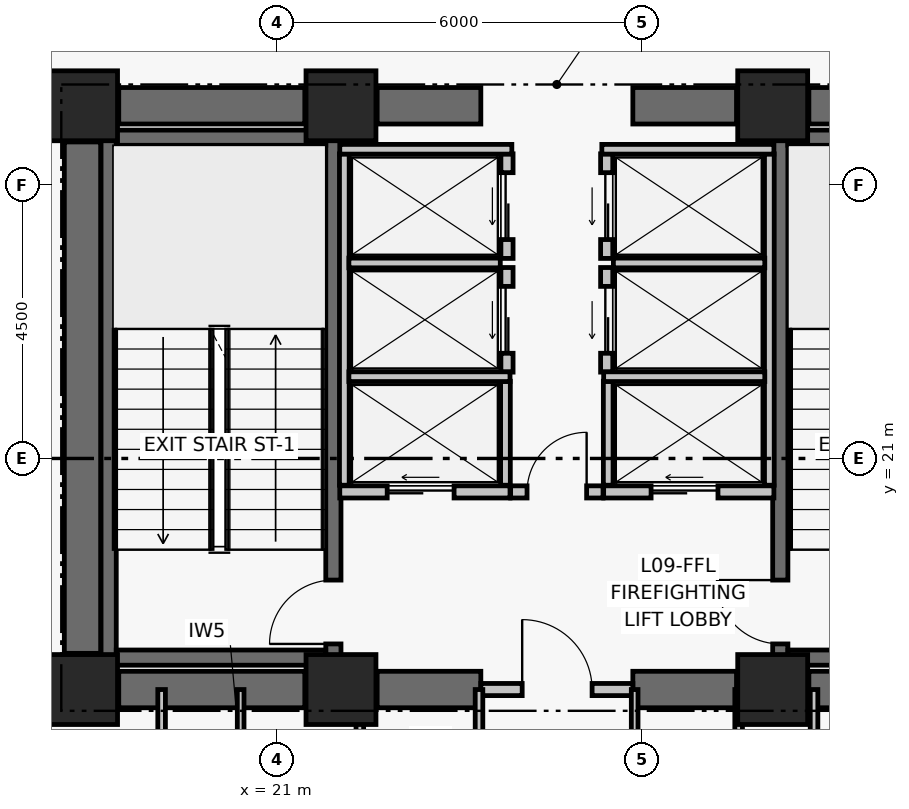
"""IFC4 building model, lengths in metres.
Left out: names, types, materials, properties, quantities, classifications, styles, units other than length and angle.
Written with IfcOpenShell. Run it as: python <this file> out.ifc"""

import sys

from ifc_helpers import new_model, si_unit, direction, frame, frame_2d, origin, origin_2d, place, context, subcontext, project, spatial, rectangle, extrude, element, fill, save


model = new_model("IFC4")
c1 = context("Model", 3, precision=1e-05, world=origin(), true_north=direction((0.0, 1.0)))
c2 = subcontext(c1, "Body", "Model", "MODEL_VIEW")
j1 = project(units=[si_unit("LENGTHUNIT", "METRE"), si_unit("PLANEANGLEUNIT", "RADIAN")], contexts=[c1])
p1 = place(None, origin())
s1 = spatial("IfcSite", under=j1, at=p1, CompositionType="ELEMENT")
p2 = place(p1, origin())
s2 = spatial("IfcBuilding", under=s1, at=p2, CompositionType="ELEMENT")
p3 = place(p2, frame((0.0, 0.0, 42.48)))
s3 = spatial("IfcBuildingStorey", under=s2, at=p3, CompositionType="ELEMENT", Elevation=42.48)
for number, where, z_axis, x_axis in (
    (1, (17.8, 17.2, 0.0), (0.0, 0.0, 1.0), (1.0, 0.0, 0.0)),
    (2, (22.05, 17.2, 0.0), (0.0, 0.0, 1.0), (1.0, 0.0, 0.0)),
    (3, (29.15, 17.2, 0.0), (0.0, 0.0, 1.0), (1.0, 0.0, 0.0)),
    (4, (17.8, 26.8, 0.0), (0.0, 0.0, 1.0), (1.0, 0.0, 0.0)),
    (5, (22.05, 26.8, 0.0), (0.0, 0.0, 1.0), (1.0, 0.0, 0.0)),
    (6, (29.15, 26.8, 0.0), (0.0, 0.0, 1.0), (1.0, 0.0, 0.0)),
):
    element("IfcColumn", number, at=place(p3, frame(where, z_axis=z_axis, x_axis=x_axis)), inside=s3, PredefinedType="COLUMN", context=c2, shape_type="SweptSolid", body=[
        extrude(rectangle(XDim=1.15, YDim=1.15, at=origin_2d()), origin(), (0.0, 0.0, 1.0), 3.72),
    ])
p4 = place(p3, frame((18.395, 17.2, 0.0), z_axis=(0.0, 0.0, 1.0), x_axis=(1.0, 0.0, 0.0)))
e7 = element("IfcWall", 7, at=p4, inside=s3, PredefinedType="SHEAR", context=c2, shape_type="SweptSolid", body=[
    extrude(rectangle(XDim=3.06, YDim=0.6, at=frame_2d((1.53, 0.0))), origin(), (0.0, 0.0, 1.0), 3.47),
])
p5 = place(p3, frame((22.645, 17.2, 0.0), z_axis=(0.0, 0.0, 1.0), x_axis=(1.0, 0.0, 0.0)))
e8 = element("IfcWall", 8, at=p5, inside=s3, PredefinedType="SHEAR", context=c2, shape_type="SweptSolid", body=[
    extrude(rectangle(XDim=1.705, YDim=0.6, at=frame_2d((0.853, 0.0))), origin(), (0.0, 0.0, 1.0), 3.47),
])
p6 = place(p3, frame((26.85, 17.2, 0.0), z_axis=(0.0, 0.0, 1.0), x_axis=(1.0, 0.0, 0.0)))
e9 = element("IfcWall", 9, at=p6, inside=s3, PredefinedType="SHEAR", context=c2, shape_type="SweptSolid", body=[
    extrude(rectangle(XDim=1.705, YDim=0.6, at=frame_2d((0.853, 0.0))), origin(), (0.0, 0.0, 1.0), 3.47),
])
p7 = place(p3, frame((29.745, 17.2, 0.0), z_axis=(0.0, 0.0, 1.0), x_axis=(1.0, 0.0, 0.0)))
e10 = element("IfcWall", 10, at=p7, inside=s3, PredefinedType="SHEAR", context=c2, shape_type="SweptSolid", body=[
    extrude(rectangle(XDim=3.06, YDim=0.6, at=frame_2d((1.53, 0.0))), origin(), (0.0, 0.0, 1.0), 3.47),
])
p8 = place(p3, frame((18.395, 26.8, 0.0), z_axis=(0.0, 0.0, 1.0), x_axis=(1.0, 0.0, 0.0)))
e11 = element("IfcWall", 11, at=p8, inside=s3, PredefinedType="SHEAR", context=c2, shape_type="SweptSolid", body=[
    extrude(rectangle(XDim=3.06, YDim=0.6, at=frame_2d((1.53, 0.0))), origin(), (0.0, 0.0, 1.0), 3.47),
])
p9 = place(p3, frame((22.645, 26.8, 0.0), z_axis=(0.0, 0.0, 1.0), x_axis=(1.0, 0.0, 0.0)))
e12 = element("IfcWall", 12, at=p9, inside=s3, PredefinedType="SHEAR", context=c2, shape_type="SweptSolid", body=[
    extrude(rectangle(XDim=1.705, YDim=0.6, at=frame_2d((0.853, 0.0))), origin(), (0.0, 0.0, 1.0), 3.47),
])
p10 = place(p3, frame((26.85, 26.8, 0.0), z_axis=(0.0, 0.0, 1.0), x_axis=(1.0, 0.0, 0.0)))
e13 = element("IfcWall", 13, at=p10, inside=s3, PredefinedType="SHEAR", context=c2, shape_type="SweptSolid", body=[
    extrude(rectangle(XDim=1.705, YDim=0.6, at=frame_2d((0.853, 0.0))), origin(), (0.0, 0.0, 1.0), 3.47),
])
p11 = place(p3, frame((29.745, 26.8, 0.0), z_axis=(0.0, 0.0, 1.0), x_axis=(1.0, 0.0, 0.0)))
e14 = element("IfcWall", 14, at=p11, inside=s3, PredefinedType="SHEAR", context=c2, shape_type="SweptSolid", body=[
    extrude(rectangle(XDim=3.06, YDim=0.6, at=frame_2d((1.53, 0.0))), origin(), (0.0, 0.0, 1.0), 3.47),
])
p12 = place(p3, frame((17.8, 17.795, 0.0), z_axis=(0.0, 0.0, 1.0), x_axis=(0.0, 1.0, 0.0)))
e15 = element("IfcWall", 15, at=p12, inside=s3, PredefinedType="SHEAR", context=c2, shape_type="SweptSolid", body=[
    extrude(rectangle(XDim=8.41, YDim=0.6, at=frame_2d((4.205, 0.0))), origin(), (0.0, 0.0, 1.0), 3.47),
])
p13 = place(p3, frame((18.229, 17.6, 0.0), z_axis=(0.0, 0.0, 1.0), x_axis=(0.0, 1.0, 0.0)))
e16 = element("IfcWall", 16, at=p13, inside=s3, PredefinedType="SHEAR", context=c2, shape_type="SweptSolid", body=[
    extrude(rectangle(XDim=8.8, YDim=0.25, at=frame_2d((4.4, 0.0))), origin(), (0.0, 0.0, 1.0), 3.47),
])
p14 = place(p3, frame((21.925, 17.6, 0.0), z_axis=(0.0, 0.0, 1.0), x_axis=(0.0, 1.0, 0.0)))
e17 = element("IfcWall", 17, at=p14, inside=s3, PredefinedType="SHEAR", context=c2, shape_type="SweptSolid", body=[
    extrude(rectangle(XDim=8.8, YDim=0.25, at=frame_2d((4.4, 0.0))), origin(), (0.0, 0.0, 1.0), 3.47),
])
p15 = place(p14, frame((0.35, 0.0, 0.0)))
e18 = element("IfcOpeningElement", 18, at=p15, cuts=e17, PredefinedType="OPENING", context=c2, shape_type="SweptSolid", body=[
    extrude(rectangle(XDim=1.05, YDim=2.08, at=frame_2d((0.525, 1.04))), frame((0.0, 0.135, 0.0), z_axis=(0.0, -1.0, 0.0), x_axis=(1.0, 0.0, 0.0)), (0.0, 0.0, 1.0), 0.27),
])
for number, where, z_axis, x_axis in (
    (19, (18.354, 17.725, 0.0), (0.0, 0.0, 1.0), (1.0, 0.0, 0.0)),
    (20, (18.354, 26.275, 0.0), (0.0, 0.0, 1.0), (1.0, 0.0, 0.0)),
):
    element("IfcWall", number, at=place(p3, frame(where, z_axis=z_axis, x_axis=x_axis)), inside=s3, PredefinedType="SHEAR", context=c2, shape_type="SweptSolid", body=[
        extrude(rectangle(XDim=3.446, YDim=0.25, at=frame_2d((1.723, 0.0))), origin(), (0.0, 0.0, 1.0), 3.47),
    ])
p16 = place(p3, frame((29.275, 17.6, 0.0), z_axis=(0.0, 0.0, 1.0), x_axis=(0.0, 1.0, 0.0)))
e21 = element("IfcWall", 21, at=p16, inside=s3, PredefinedType="SHEAR", context=c2, shape_type="SweptSolid", body=[
    extrude(rectangle(XDim=8.8, YDim=0.25, at=frame_2d((4.4, 0.0))), origin(), (0.0, 0.0, 1.0), 3.47),
])
p17 = place(p16, frame((0.35, 0.0, 0.0)))
e22 = element("IfcOpeningElement", 22, at=p17, cuts=e21, PredefinedType="OPENING", context=c2, shape_type="SweptSolid", body=[
    extrude(rectangle(XDim=1.05, YDim=2.08, at=frame_2d((0.525, 1.04))), frame((0.0, 0.135, 0.0), z_axis=(0.0, -1.0, 0.0), x_axis=(1.0, 0.0, 0.0)), (0.0, 0.0, 1.0), 0.27),
])
for number, where, z_axis, x_axis in (
    (23, (29.4, 17.725, 0.0), (0.0, 0.0, 1.0), (1.0, 0.0, 0.0)),
    (24, (29.4, 26.275, 0.0), (0.0, 0.0, 1.0), (1.0, 0.0, 0.0)),
):
    element("IfcWall", number, at=place(p3, frame(where, z_axis=z_axis, x_axis=x_axis)), inside=s3, PredefinedType="SHEAR", context=c2, shape_type="SweptSolid", body=[
        extrude(rectangle(XDim=3.446, YDim=0.25, at=frame_2d((1.723, 0.0))), origin(), (0.0, 0.0, 1.0), 3.47),
    ])
p18 = place(p3, frame((24.35, 17.2, 0.0), z_axis=(0.0, 0.0, 1.0), x_axis=(1.0, 0.0, 0.0)))
e25 = element("IfcWall", 25, at=p18, inside=s3, PredefinedType="PARTITIONING", context=c2, shape_type="SweptSolid", body=[
    extrude(rectangle(XDim=2.5, YDim=0.2, at=frame_2d((1.25, 0.0))), origin(), (0.0, 0.0, 1.0), 2.6),
])
p19 = place(p18, frame((0.68, 0.0, 0.0)))
e26 = element("IfcOpeningElement", 26, at=p19, cuts=e25, PredefinedType="OPENING", context=c2, shape_type="SweptSolid", body=[
    extrude(rectangle(XDim=1.15, YDim=2.08, at=frame_2d((0.575, 1.04))), frame((0.0, 0.11, 0.0), z_axis=(0.0, -1.0, 0.0), x_axis=(1.0, 0.0, 0.0)), (0.0, 0.0, 1.0), 0.22),
])
p20 = place(p3, frame((24.84, 20.45, 0.0), z_axis=(0.0, 0.0, 1.0), x_axis=(1.0, 0.0, 0.0)))
e27 = element("IfcWall", 27, at=p20, inside=s3, PredefinedType="PARTITIONING", context=c2, shape_type="SweptSolid", body=[
    extrude(rectangle(XDim=1.52, YDim=0.2, at=frame_2d((0.76, 0.0))), origin(), (0.0, 0.0, 1.0), 3.47),
])
p21 = place(p20, frame((0.27, 0.0, 0.0)))
e28 = element("IfcOpeningElement", 28, at=p21, cuts=e27, PredefinedType="OPENING", context=c2, shape_type="SweptSolid", body=[
    extrude(rectangle(XDim=0.98, YDim=2.06, at=frame_2d((0.49, 1.03))), frame((0.0, 0.11, 0.0), z_axis=(0.0, -1.0, 0.0), x_axis=(1.0, 0.0, 0.0)), (0.0, 0.0, 1.0), 0.22),
])
p22 = place(p3, frame((22.03, 20.45, 0.0), z_axis=(0.0, 0.0, 1.0), x_axis=(1.0, 0.0, 0.0)))
e29 = element("IfcWall", 29, at=p22, inside=s3, PredefinedType="PARTITIONING", context=c2, shape_type="SweptSolid", body=[
    extrude(rectangle(XDim=2.8, YDim=0.2, at=frame_2d((1.4, 0.0))), origin(), (0.0, 0.0, 1.0), 3.47),
])
p23 = place(p22, frame((0.78, 0.0, 0.0)))
e30 = element("IfcOpeningElement", 30, at=p23, cuts=e29, PredefinedType="OPENING", context=c2, shape_type="SweptSolid", body=[
    extrude(rectangle(XDim=1.1, YDim=2.08, at=frame_2d((0.55, 1.04))), frame((0.0, 0.11, 0.0), z_axis=(0.0, -1.0, 0.0), x_axis=(1.0, 0.0, 0.0)), (0.0, 0.0, 1.0), 0.22),
])
p24 = place(p3, frame((26.37, 20.45, 0.0), z_axis=(0.0, 0.0, 1.0), x_axis=(1.0, 0.0, 0.0)))
e31 = element("IfcWall", 31, at=p24, inside=s3, PredefinedType="PARTITIONING", context=c2, shape_type="SweptSolid", body=[
    extrude(rectangle(XDim=2.8, YDim=0.2, at=frame_2d((1.4, 0.0))), origin(), (0.0, 0.0, 1.0), 3.47),
])
p25 = place(p24, frame((0.78, 0.0, 0.0)))
e32 = element("IfcOpeningElement", 32, at=p25, cuts=e31, PredefinedType="OPENING", context=c2, shape_type="SweptSolid", body=[
    extrude(rectangle(XDim=1.1, YDim=2.08, at=frame_2d((0.55, 1.04))), frame((0.0, 0.11, 0.0), z_axis=(0.0, -1.0, 0.0), x_axis=(1.0, 0.0, 0.0)), (0.0, 0.0, 1.0), 0.22),
])
p26 = place(p3, frame((24.78, 22.42, 0.0), z_axis=(0.0, 0.0, 1.0), x_axis=(0.0, 1.0, 0.0)))
e33 = element("IfcWall", 33, at=p26, inside=s3, PredefinedType="PARTITIONING", context=c2, shape_type="SweptSolid", body=[
    extrude(rectangle(XDim=1.72, YDim=0.2, at=frame_2d((0.86, 0.0))), origin(), (0.0, 0.0, 1.0), 3.47),
])
p27 = place(p26, frame((0.31, 0.0, 0.0)))
e34 = element("IfcOpeningElement", 34, at=p27, cuts=e33, PredefinedType="OPENING", context=c2, shape_type="SweptSolid", body=[
    extrude(rectangle(XDim=1.1, YDim=2.08, at=frame_2d((0.55, 1.04))), frame((0.0, 0.11, 0.0), z_axis=(0.0, -1.0, 0.0), x_axis=(1.0, 0.0, 0.0)), (0.0, 0.0, 1.0), 0.22),
])
p28 = place(p3, frame((24.78, 24.29, 0.0), z_axis=(0.0, 0.0, 1.0), x_axis=(0.0, 1.0, 0.0)))
e35 = element("IfcWall", 35, at=p28, inside=s3, PredefinedType="PARTITIONING", context=c2, shape_type="SweptSolid", body=[
    extrude(rectangle(XDim=1.72, YDim=0.2, at=frame_2d((0.86, 0.0))), origin(), (0.0, 0.0, 1.0), 3.47),
])
p29 = place(p28, frame((0.31, 0.0, 0.0)))
e36 = element("IfcOpeningElement", 36, at=p29, cuts=e35, PredefinedType="OPENING", context=c2, shape_type="SweptSolid", body=[
    extrude(rectangle(XDim=1.1, YDim=2.08, at=frame_2d((0.55, 1.04))), frame((0.0, 0.11, 0.0), z_axis=(0.0, -1.0, 0.0), x_axis=(1.0, 0.0, 0.0)), (0.0, 0.0, 1.0), 0.22),
])
p30 = place(p3, frame((26.42, 22.42, 0.0), z_axis=(0.0, 0.0, 1.0), x_axis=(0.0, 1.0, 0.0)))
e37 = element("IfcWall", 37, at=p30, inside=s3, PredefinedType="PARTITIONING", context=c2, shape_type="SweptSolid", body=[
    extrude(rectangle(XDim=1.72, YDim=0.2, at=frame_2d((0.86, 0.0))), origin(), (0.0, 0.0, 1.0), 3.47),
])
p31 = place(p30, frame((0.31, 0.0, 0.0)))
e38 = element("IfcOpeningElement", 38, at=p31, cuts=e37, PredefinedType="OPENING", context=c2, shape_type="SweptSolid", body=[
    extrude(rectangle(XDim=1.1, YDim=2.08, at=frame_2d((0.55, 1.04))), frame((0.0, 0.11, 0.0), z_axis=(0.0, -1.0, 0.0), x_axis=(1.0, 0.0, 0.0)), (0.0, 0.0, 1.0), 0.22),
])
p32 = place(p3, frame((26.42, 24.29, 0.0), z_axis=(0.0, 0.0, 1.0), x_axis=(0.0, 1.0, 0.0)))
e39 = element("IfcWall", 39, at=p32, inside=s3, PredefinedType="PARTITIONING", context=c2, shape_type="SweptSolid", body=[
    extrude(rectangle(XDim=1.72, YDim=0.2, at=frame_2d((0.86, 0.0))), origin(), (0.0, 0.0, 1.0), 3.47),
])
p33 = place(p32, frame((0.31, 0.0, 0.0)))
e40 = element("IfcOpeningElement", 40, at=p33, cuts=e39, PredefinedType="OPENING", context=c2, shape_type="SweptSolid", body=[
    extrude(rectangle(XDim=1.1, YDim=2.08, at=frame_2d((0.55, 1.04))), frame((0.0, 0.11, 0.0), z_axis=(0.0, -1.0, 0.0), x_axis=(1.0, 0.0, 0.0)), (0.0, 0.0, 1.0), 0.22),
])
p34 = place(p3, frame((22.105, 20.56, 0.0), z_axis=(0.0, 0.0, 1.0), x_axis=(0.0, 1.0, 0.0)))
e41 = element("IfcWall", 41, at=p34, inside=s3, PredefinedType="PARTITIONING", context=c2, shape_type="SweptSolid", body=[
    extrude(rectangle(XDim=5.45, YDim=0.16, at=frame_2d((2.725, 0.0))), origin(), (0.0, 0.0, 1.0), 3.47),
])
p35 = place(p3, frame((24.755, 20.56, 0.0), z_axis=(0.0, 0.0, 1.0), x_axis=(0.0, 1.0, 0.0)))
e42 = element("IfcWall", 42, at=p35, inside=s3, PredefinedType="PARTITIONING", context=c2, shape_type="SweptSolid", body=[
    extrude(rectangle(XDim=1.71, YDim=0.16, at=frame_2d((0.855, 0.0))), origin(), (0.0, 0.0, 1.0), 3.47),
])
p36 = place(p3, frame((22.18, 22.345, 0.0), z_axis=(0.0, 0.0, 1.0), x_axis=(1.0, 0.0, 0.0)))
e43 = element("IfcWall", 43, at=p36, inside=s3, PredefinedType="PARTITIONING", context=c2, shape_type="SweptSolid", body=[
    extrude(rectangle(XDim=2.65, YDim=0.16, at=frame_2d((1.325, 0.0))), origin(), (0.0, 0.0, 1.0), 3.47),
])
p37 = place(p3, frame((22.18, 24.215, 0.0), z_axis=(0.0, 0.0, 1.0), x_axis=(1.0, 0.0, 0.0)))
e44 = element("IfcWall", 44, at=p37, inside=s3, PredefinedType="PARTITIONING", context=c2, shape_type="SweptSolid", body=[
    extrude(rectangle(XDim=2.49, YDim=0.16, at=frame_2d((1.245, 0.0))), origin(), (0.0, 0.0, 1.0), 3.47),
])
p38 = place(p3, frame((22.03, 26.085, 0.0), z_axis=(0.0, 0.0, 1.0), x_axis=(1.0, 0.0, 0.0)))
e45 = element("IfcWall", 45, at=p38, inside=s3, PredefinedType="PARTITIONING", context=c2, shape_type="SweptSolid", body=[
    extrude(rectangle(XDim=2.83, YDim=0.16, at=frame_2d((1.415, 0.0))), origin(), (0.0, 0.0, 1.0), 3.47),
])
p39 = place(p3, frame((29.095, 20.56, 0.0), z_axis=(0.0, 0.0, 1.0), x_axis=(0.0, 1.0, 0.0)))
e46 = element("IfcWall", 46, at=p39, inside=s3, PredefinedType="PARTITIONING", context=c2, shape_type="SweptSolid", body=[
    extrude(rectangle(XDim=5.45, YDim=0.16, at=frame_2d((2.725, 0.0))), origin(), (0.0, 0.0, 1.0), 3.47),
])
p40 = place(p3, frame((26.445, 20.56, 0.0), z_axis=(0.0, 0.0, 1.0), x_axis=(0.0, 1.0, 0.0)))
e47 = element("IfcWall", 47, at=p40, inside=s3, PredefinedType="PARTITIONING", context=c2, shape_type="SweptSolid", body=[
    extrude(rectangle(XDim=1.71, YDim=0.16, at=frame_2d((0.855, 0.0))), origin(), (0.0, 0.0, 1.0), 3.47),
])
p41 = place(p3, frame((26.37, 22.345, 0.0), z_axis=(0.0, 0.0, 1.0), x_axis=(1.0, 0.0, 0.0)))
e48 = element("IfcWall", 48, at=p41, inside=s3, PredefinedType="PARTITIONING", context=c2, shape_type="SweptSolid", body=[
    extrude(rectangle(XDim=2.65, YDim=0.16, at=frame_2d((1.325, 0.0))), origin(), (0.0, 0.0, 1.0), 3.47),
])
p42 = place(p3, frame((26.53, 24.215, 0.0), z_axis=(0.0, 0.0, 1.0), x_axis=(1.0, 0.0, 0.0)))
e49 = element("IfcWall", 49, at=p42, inside=s3, PredefinedType="PARTITIONING", context=c2, shape_type="SweptSolid", body=[
    extrude(rectangle(XDim=2.49, YDim=0.16, at=frame_2d((1.245, 0.0))), origin(), (0.0, 0.0, 1.0), 3.47),
])
p43 = place(p3, frame((26.34, 26.085, 0.0), z_axis=(0.0, 0.0, 1.0), x_axis=(1.0, 0.0, 0.0)))
e50 = element("IfcWall", 50, at=p43, inside=s3, PredefinedType="PARTITIONING", context=c2, shape_type="SweptSolid", body=[
    extrude(rectangle(XDim=2.83, YDim=0.16, at=frame_2d((1.415, 0.0))), origin(), (0.0, 0.0, 1.0), 3.47),
])
p44 = place(p3, frame((19.1, 14.95, 0.0), z_axis=(0.0, 0.0, 1.0), x_axis=(0.0, 1.0, 0.0)))
e51 = element("IfcWall", 51, at=p44, inside=s3, PredefinedType="PARTITIONING", context=c2, shape_type="SweptSolid", body=[
    extrude(rectangle(XDim=2.25, YDim=0.125, at=frame_2d((1.125, 0.0))), origin(), (0.0, 0.0, 1.0), 2.6),
])
p45 = place(p3, frame((20.4, 14.95, 0.0), z_axis=(0.0, 0.0, 1.0), x_axis=(0.0, 1.0, 0.0)))
e52 = element("IfcWall", 52, at=p45, inside=s3, PredefinedType="PARTITIONING", context=c2, shape_type="SweptSolid", body=[
    extrude(rectangle(XDim=2.25, YDim=0.11, at=frame_2d((1.125, 0.0))), origin(), (0.0, 0.0, 1.0), 2.6),
])
for number, where, z_axis, x_axis in (
    (53, (22.36, 14.95, 0.0), (0.0, 0.0, 1.0), (0.0, 1.0, 0.0)),
    (54, (24.32, 14.95, 0.0), (0.0, 0.0, 1.0), (0.0, 1.0, 0.0)),
):
    element("IfcWall", number, at=place(p3, frame(where, z_axis=z_axis, x_axis=x_axis)), inside=s3, PredefinedType="PARTITIONING", context=c2, shape_type="SweptSolid", body=[
        extrude(rectangle(XDim=2.25, YDim=0.125, at=frame_2d((1.125, 0.0))), origin(), (0.0, 0.0, 1.0), 2.6),
    ])
p46 = place(p3, frame((26.88, 14.95, 0.0), z_axis=(0.0, 0.0, 1.0), x_axis=(0.0, 1.0, 0.0)))
e55 = element("IfcWall", 55, at=p46, inside=s3, PredefinedType="PARTITIONING", context=c2, shape_type="SweptSolid", body=[
    extrude(rectangle(XDim=2.25, YDim=0.11, at=frame_2d((1.125, 0.0))), origin(), (0.0, 0.0, 1.0), 2.6),
])
for number, where, z_axis, x_axis in (
    (56, (28.59, 14.95, 0.0), (0.0, 0.0, 1.0), (0.0, 1.0, 0.0)),
    (57, (29.83, 14.95, 0.0), (0.0, 0.0, 1.0), (0.0, 1.0, 0.0)),
):
    element("IfcWall", number, at=place(p3, frame(where, z_axis=z_axis, x_axis=x_axis)), inside=s3, PredefinedType="PARTITIONING", context=c2, shape_type="SweptSolid", body=[
        extrude(rectangle(XDim=2.25, YDim=0.125, at=frame_2d((1.125, 0.0))), origin(), (0.0, 0.0, 1.0), 2.6),
    ])
p47 = place(p15, origin())
e58 = element("IfcDoor", 58, at=p47, inside=s3, OperationType="SINGLE_SWING_LEFT", PredefinedType="DOOR", context=c2, shape_type="SweptSolid", body=[
    extrude(rectangle(XDim=1.05, YDim=2.08, at=frame_2d((0.525, 1.04))), frame((0.0, 0.025, 0.0), z_axis=(0.0, -1.0, 0.0), x_axis=(1.0, 0.0, 0.0)), (0.0, 0.0, 1.0), 0.05),
])
fill(e18, e58)
p48 = place(p17, origin())
e59 = element("IfcDoor", 59, at=p48, inside=s3, OperationType="SINGLE_SWING_RIGHT", PredefinedType="DOOR", context=c2, shape_type="SweptSolid", body=[
    extrude(rectangle(XDim=1.05, YDim=2.08, at=frame_2d((0.525, 1.04))), frame((0.0, 0.025, 0.0), z_axis=(0.0, -1.0, 0.0), x_axis=(1.0, 0.0, 0.0)), (0.0, 0.0, 1.0), 0.05),
])
fill(e22, e59)
p49 = place(p19, origin())
e60 = element("IfcDoor", 60, at=p49, inside=s3, OperationType="SINGLE_SWING_LEFT", PredefinedType="DOOR", context=c2, shape_type="SweptSolid", body=[
    extrude(rectangle(XDim=1.15, YDim=2.08, at=frame_2d((0.575, 1.04))), frame((0.0, 0.025, 0.0), z_axis=(0.0, -1.0, 0.0), x_axis=(1.0, 0.0, 0.0)), (0.0, 0.0, 1.0), 0.05),
])
fill(e26, e60)
p50 = place(p21, origin())
e61 = element("IfcDoor", 61, at=p50, inside=s3, OperationType="SINGLE_SWING_RIGHT", PredefinedType="DOOR", context=c2, shape_type="SweptSolid", body=[
    extrude(rectangle(XDim=0.98, YDim=2.06, at=frame_2d((0.49, 1.03))), frame((0.0, 0.025, 0.0), z_axis=(0.0, -1.0, 0.0), x_axis=(1.0, 0.0, 0.0)), (0.0, 0.0, 1.0), 0.05),
])
fill(e28, e61)
p51 = place(p23, origin())
e62 = element("IfcDoor", 62, at=p51, inside=s3, OperationType="DOUBLE_DOOR_SLIDING", PredefinedType="DOOR", context=c2, shape_type="SweptSolid", body=[
    extrude(rectangle(XDim=1.1, YDim=2.08, at=frame_2d((0.55, 1.04))), frame((0.0, 0.025, 0.0), z_axis=(0.0, -1.0, 0.0), x_axis=(1.0, 0.0, 0.0)), (0.0, 0.0, 1.0), 0.05),
])
fill(e30, e62)
p52 = place(p25, origin())
e63 = element("IfcDoor", 63, at=p52, inside=s3, OperationType="DOUBLE_DOOR_SLIDING", PredefinedType="DOOR", context=c2, shape_type="SweptSolid", body=[
    extrude(rectangle(XDim=1.1, YDim=2.08, at=frame_2d((0.55, 1.04))), frame((0.0, 0.025, 0.0), z_axis=(0.0, -1.0, 0.0), x_axis=(1.0, 0.0, 0.0)), (0.0, 0.0, 1.0), 0.05),
])
fill(e32, e63)
p53 = place(p27, origin())
e64 = element("IfcDoor", 64, at=p53, inside=s3, OperationType="DOUBLE_DOOR_SLIDING", PredefinedType="DOOR", context=c2, shape_type="SweptSolid", body=[
    extrude(rectangle(XDim=1.1, YDim=2.08, at=frame_2d((0.55, 1.04))), frame((0.0, 0.025, 0.0), z_axis=(0.0, -1.0, 0.0), x_axis=(1.0, 0.0, 0.0)), (0.0, 0.0, 1.0), 0.05),
])
fill(e34, e64)
p54 = place(p29, origin())
e65 = element("IfcDoor", 65, at=p54, inside=s3, OperationType="DOUBLE_DOOR_SLIDING", PredefinedType="DOOR", context=c2, shape_type="SweptSolid", body=[
    extrude(rectangle(XDim=1.1, YDim=2.08, at=frame_2d((0.55, 1.04))), frame((0.0, 0.025, 0.0), z_axis=(0.0, -1.0, 0.0), x_axis=(1.0, 0.0, 0.0)), (0.0, 0.0, 1.0), 0.05),
])
fill(e36, e65)
p55 = place(p31, origin())
e66 = element("IfcDoor", 66, at=p55, inside=s3, OperationType="DOUBLE_DOOR_SLIDING", PredefinedType="DOOR", context=c2, shape_type="SweptSolid", body=[
    extrude(rectangle(XDim=1.1, YDim=2.08, at=frame_2d((0.55, 1.04))), frame((0.0, 0.025, 0.0), z_axis=(0.0, -1.0, 0.0), x_axis=(1.0, 0.0, 0.0)), (0.0, 0.0, 1.0), 0.05),
])
fill(e38, e66)
p56 = place(p33, origin())
e67 = element("IfcDoor", 67, at=p56, inside=s3, OperationType="DOUBLE_DOOR_SLIDING", PredefinedType="DOOR", context=c2, shape_type="SweptSolid", body=[
    extrude(rectangle(XDim=1.1, YDim=2.08, at=frame_2d((0.55, 1.04))), frame((0.0, 0.025, 0.0), z_axis=(0.0, -1.0, 0.0), x_axis=(1.0, 0.0, 0.0)), (0.0, 0.0, 1.0), 0.05),
])
fill(e40, e67)
save(model, sys.argv[1])
